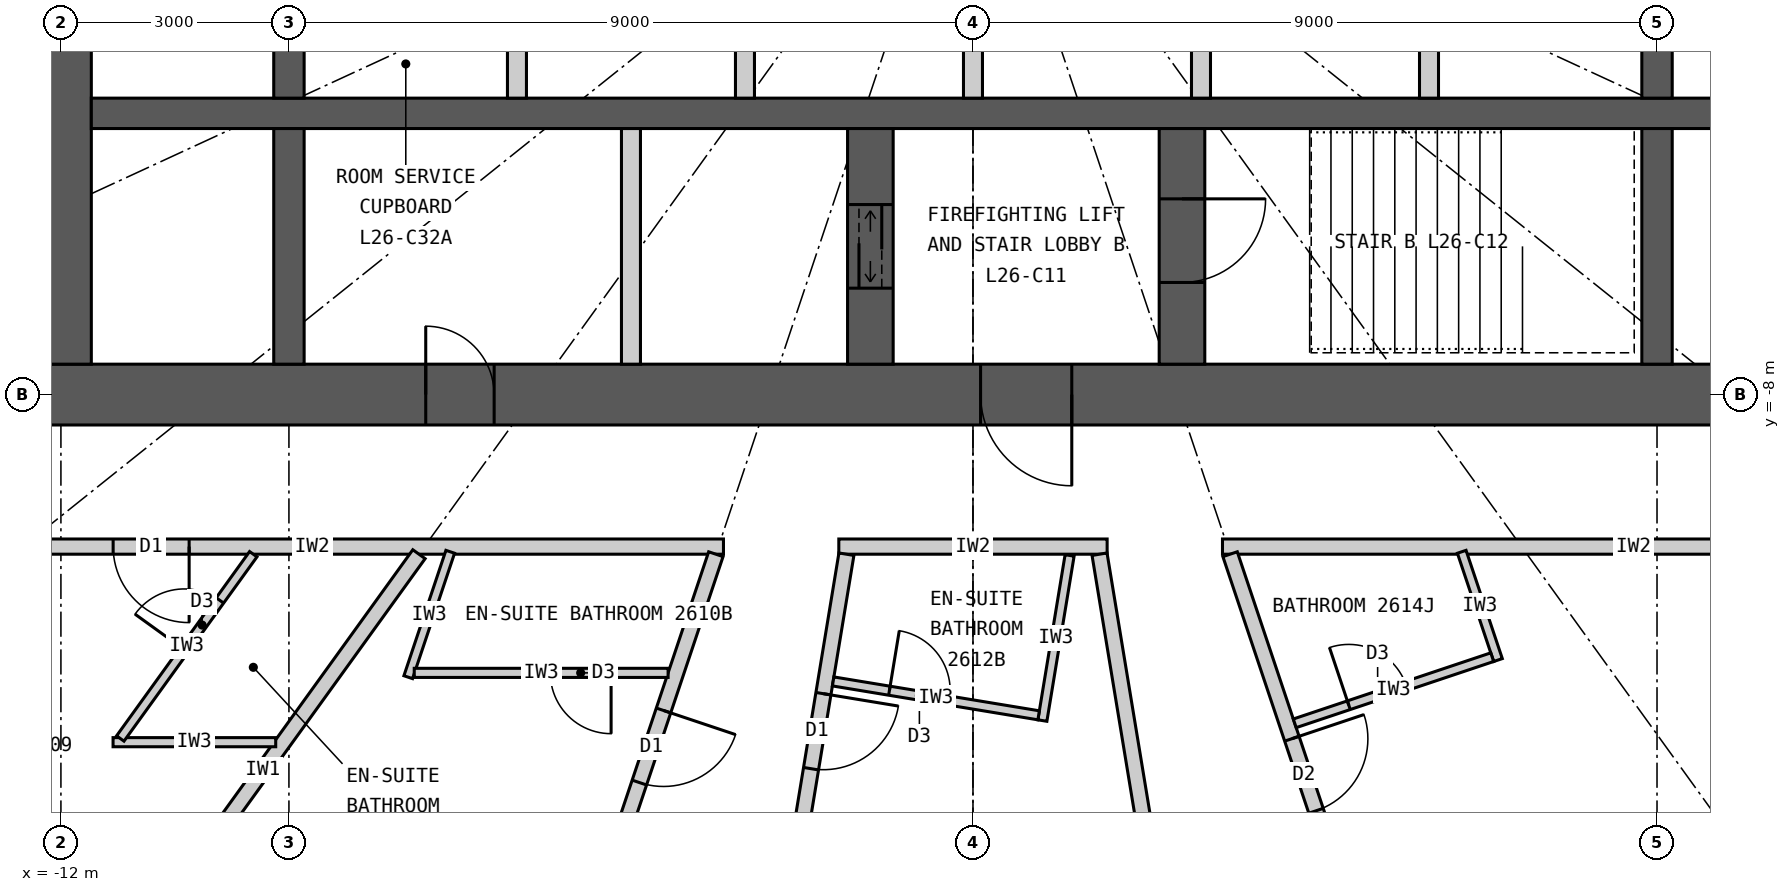
"""IFC4 building model, lengths in metres.
Left out: names, types, materials, properties, quantities, classifications, styles, units other than length and angle.
Written with IfcOpenShell. Run it as: python <this file> out.ifc"""

import sys

from ifc_helpers import new_model, si_unit, direction, frame, frame_2d, origin, place, context, subcontext, project, spatial, rectangle, extrude, element, fill, save


model = new_model("IFC4")
c1 = context("Model", 3, precision=1e-05, world=origin(), true_north=direction((0.0, 1.0)))
c2 = subcontext(c1, "Body", "Model", "MODEL_VIEW")
j1 = project(units=[si_unit("LENGTHUNIT", "METRE"), si_unit("PLANEANGLEUNIT", "RADIAN")], contexts=[c1])
p1 = place(None, origin())
s1 = spatial("IfcSite", under=j1, at=p1, CompositionType="ELEMENT")
p2 = place(p1, origin())
s2 = spatial("IfcBuilding", under=s1, at=p2, CompositionType="ELEMENT")
p3 = place(p2, frame((0.0, 0.0, 105.6)))
s3 = spatial("IfcBuildingStorey", under=s2, at=p3, CompositionType="ELEMENT", Elevation=105.6)
p4 = place(p3, frame((12.4, -8.0, 0.0), z_axis=(0.0, 0.0, 1.0), x_axis=(-1.0, 0.0, 0.0)))
e1 = element("IfcWall", 1, at=p4, inside=s3, PredefinedType="SHEAR", context=c2, shape_type="SweptSolid", body=[
    extrude(rectangle(XDim=24.8, YDim=0.8, at=frame_2d((12.4, 0.0))), origin(), (0.0, 0.0, 1.0), 3.3),
])
p5 = place(p4, frame((11.1, 0.0, 0.0)))
e2 = element("IfcOpeningElement", 2, at=p5, cuts=e1, PredefinedType="OPENING", context=c2, shape_type="SweptSolid", body=[
    extrude(rectangle(XDim=1.2, YDim=2.2, at=frame_2d((0.6, 1.1))), frame((0.0, 0.41, 0.0), z_axis=(0.0, -1.0, 0.0), x_axis=(1.0, 0.0, 0.0)), (0.0, 0.0, 1.0), 0.82),
])
p6 = place(p4, frame((18.7, 0.0, 0.0)))
e3 = element("IfcOpeningElement", 3, at=p6, cuts=e1, PredefinedType="OPENING", context=c2, shape_type="SweptSolid", body=[
    extrude(rectangle(XDim=0.9, YDim=2.2, at=frame_2d((0.45, 1.1))), frame((0.0, 0.41, 0.0), z_axis=(0.0, -1.0, 0.0), x_axis=(1.0, 0.0, 0.0)), (0.0, 0.0, 1.0), 0.82),
])
p7 = place(p3, frame((-12.0, 7.6, 0.0), z_axis=(0.0, 0.0, 1.0), x_axis=(0.0, -1.0, 0.0)))
e4 = element("IfcWall", 4, at=p7, inside=s3, PredefinedType="SHEAR", context=c2, shape_type="SweptSolid", body=[
    extrude(rectangle(XDim=15.2, YDim=0.8, at=frame_2d((7.6, 0.0))), origin(), (0.0, 0.0, 1.0), 3.3),
])
p8 = place(p7, frame((6.7, 0.0, 0.0)))
e5 = element("IfcOpeningElement", 5, at=p8, cuts=e4, PredefinedType="OPENING", context=c2, shape_type="SweptSolid", body=[
    extrude(rectangle(XDim=1.8, YDim=2.2, at=frame_2d((0.9, 1.1))), frame((0.0, 0.41, 0.0), z_axis=(0.0, -1.0, 0.0), x_axis=(1.0, 0.0, 0.0)), (0.0, 0.0, 1.0), 0.82),
])
p9 = place(p3, frame((-11.6, -4.3, 0.0), z_axis=(0.0, 0.0, 1.0), x_axis=(1.0, 0.0, 0.0)))
e6 = element("IfcWall", 6, at=p9, inside=s3, PredefinedType="SHEAR", context=c2, shape_type="SweptSolid", body=[
    extrude(rectangle(XDim=23.2, YDim=0.4, at=frame_2d((11.6, 0.0))), origin(), (0.0, 0.0, 1.0), 3.3),
])
p10 = place(p3, frame((-9.0, -4.1, 0.0), z_axis=(0.0, 0.0, 1.0), x_axis=(0.0, 1.0, 0.0)))
e7 = element("IfcWall", 7, at=p10, inside=s3, PredefinedType="SHEAR", context=c2, shape_type="SweptSolid", body=[
    extrude(rectangle(XDim=2.35, YDim=0.4, at=frame_2d((1.175, 0.0))), origin(), (0.0, 0.0, 1.0), 3.3),
])
p11 = place(p3, frame((-9.0, -7.6, 0.0), z_axis=(0.0, 0.0, 1.0), x_axis=(0.0, 1.0, 0.0)))
e8 = element("IfcWall", 8, at=p11, inside=s3, PredefinedType="SHEAR", context=c2, shape_type="SweptSolid", body=[
    extrude(rectangle(XDim=3.1, YDim=0.4, at=frame_2d((1.55, 0.0))), origin(), (0.0, 0.0, 1.0), 3.3),
])
p12 = place(p3, frame((9.0, -4.1, 0.0), z_axis=(0.0, 0.0, 1.0), x_axis=(0.0, 1.0, 0.0)))
e9 = element("IfcWall", 9, at=p12, inside=s3, PredefinedType="SHEAR", context=c2, shape_type="SweptSolid", body=[
    extrude(rectangle(XDim=2.35, YDim=0.4, at=frame_2d((1.175, 0.0))), origin(), (0.0, 0.0, 1.0), 3.3),
])
p13 = place(p3, frame((9.0, -7.6, 0.0), z_axis=(0.0, 0.0, 1.0), x_axis=(0.0, 1.0, 0.0)))
e10 = element("IfcWall", 10, at=p13, inside=s3, PredefinedType="SHEAR", context=c2, shape_type="SweptSolid", body=[
    extrude(rectangle(XDim=3.1, YDim=0.4, at=frame_2d((1.55, 0.0))), origin(), (0.0, 0.0, 1.0), 3.3),
])
p14 = place(p3, frame((2.75, -7.6, 0.0), z_axis=(0.0, 0.0, 1.0), x_axis=(0.0, 1.0, 0.0)))
e11 = element("IfcWall", 11, at=p14, inside=s3, PredefinedType="SHEAR", context=c2, shape_type="SweptSolid", body=[
    extrude(rectangle(XDim=3.1, YDim=0.6, at=frame_2d((1.55, 0.0))), origin(), (0.0, 0.0, 1.0), 3.3),
])
p15 = place(p14, frame((1.075, 0.0, 0.0)))
e12 = element("IfcOpeningElement", 12, at=p15, cuts=e11, PredefinedType="OPENING", context=c2, shape_type="SweptSolid", body=[
    extrude(rectangle(XDim=1.1, YDim=2.2, at=frame_2d((0.55, 1.1))), frame((0.0, 0.31, 0.0), z_axis=(0.0, -1.0, 0.0), x_axis=(1.0, 0.0, 0.0)), (0.0, 0.0, 1.0), 0.62),
])
p16 = place(p3, frame((-1.35, -7.6, 0.0), z_axis=(0.0, 0.0, 1.0), x_axis=(0.0, 1.0, 0.0)))
e13 = element("IfcWall", 13, at=p16, inside=s3, PredefinedType="SHEAR", context=c2, shape_type="SweptSolid", body=[
    extrude(rectangle(XDim=3.1, YDim=0.6, at=frame_2d((1.55, 0.0))), origin(), (0.0, 0.0, 1.0), 3.3),
])
p17 = place(p16, frame((1.0, 0.0, 0.0)))
e14 = element("IfcOpeningElement", 14, at=p17, cuts=e13, PredefinedType="OPENING", context=c2, shape_type="SweptSolid", body=[
    extrude(rectangle(XDim=1.1, YDim=2.2, at=frame_2d((0.55, 1.1))), frame((0.0, 0.31, 0.0), z_axis=(0.0, -1.0, 0.0), x_axis=(1.0, 0.0, 0.0)), (0.0, 0.0, 1.0), 0.62),
])
p18 = place(p3, frame((-4.5, -7.6, 0.0), z_axis=(0.0, 0.0, 1.0), x_axis=(0.0, 1.0, 0.0)))
e15 = element("IfcWall", 15, at=p18, inside=s3, PredefinedType="PARTITIONING", context=c2, shape_type="SweptSolid", body=[
    extrude(rectangle(XDim=3.1, YDim=0.25, at=frame_2d((1.55, 0.0))), origin(), (0.0, 0.0, 1.0), 3.3),
])
for number, where, z_axis, x_axis in (
    (16, (-6.0, -4.1, 0.0), (0.0, 0.0, 1.0), (0.0, 1.0, 0.0)),
    (17, (-3.0, -4.1, 0.0), (0.0, 0.0, 1.0), (0.0, 1.0, 0.0)),
    (18, (0.0, -4.1, 0.0), (0.0, 0.0, 1.0), (0.0, 1.0, 0.0)),
    (19, (3.0, -4.1, 0.0), (0.0, 0.0, 1.0), (0.0, 1.0, 0.0)),
    (20, (6.0, -4.1, 0.0), (0.0, 0.0, 1.0), (0.0, 1.0, 0.0)),
):
    element("IfcWall", number, at=place(p3, frame(where, z_axis=z_axis, x_axis=x_axis)), inside=s3, PredefinedType="PARTITIONING", context=c2, shape_type="SweptSolid", body=[
        extrude(rectangle(XDim=2.35, YDim=0.25, at=frame_2d((1.175, 0.0))), origin(), (0.0, 0.0, 1.0), 3.3),
    ])
p19 = place(p3, frame((14.1, -10.0, 0.0), z_axis=(0.0, 0.0, 1.0), x_axis=(-1.0, 0.0, 0.0)))
e21 = element("IfcWall", 21, at=p19, inside=s3, PredefinedType="PARTITIONING", context=c2, shape_type="SweptSolid", body=[
    extrude(rectangle(XDim=10.817, YDim=0.2, at=frame_2d((5.409, 0.0))), origin(), (0.0, 0.0, 1.0), 3.12),
])
p20 = place(p3, frame((1.765, -10.0, 0.0), z_axis=(0.0, 0.0, 1.0), x_axis=(-1.0, 0.0, 0.0)))
e22 = element("IfcWall", 22, at=p20, inside=s3, PredefinedType="PARTITIONING", context=c2, shape_type="SweptSolid", body=[
    extrude(rectangle(XDim=3.53, YDim=0.2, at=frame_2d((1.765, 0.0))), origin(), (0.0, 0.0, 1.0), 3.12),
])
p21 = place(p3, frame((-3.283, -10.0, 0.0), z_axis=(0.0, 0.0, 1.0), x_axis=(-1.0, 0.0, 0.0)))
e23 = element("IfcWall", 23, at=p21, inside=s3, PredefinedType="PARTITIONING", context=c2, shape_type="SweptSolid", body=[
    extrude(rectangle(XDim=10.817, YDim=0.2, at=frame_2d((5.409, 0.0))), origin(), (0.0, 0.0, 1.0), 3.12),
])
p22 = place(p21, frame((7.03, 0.0, 0.0)))
e24 = element("IfcOpeningElement", 24, at=p22, cuts=e23, PredefinedType="OPENING", context=c2, shape_type="SweptSolid", body=[
    extrude(rectangle(XDim=1.0, YDim=2.2, at=frame_2d((0.5, 1.1))), frame((0.0, 0.11, 0.0), z_axis=(0.0, -1.0, 0.0), x_axis=(1.0, 0.0, 0.0)), (0.0, 0.0, 1.0), 0.22),
])
p23 = place(p3, frame((-7.289, -10.1, 0.0), z_axis=(0.0, 0.0, 1.0), x_axis=(-0.585217367024, -0.81087645997, 0.0)))
e25 = element("IfcWall", 25, at=p23, inside=s3, PredefinedType="PARTITIONING", context=c2, shape_type="SweptSolid", body=[
    extrude(rectangle(XDim=7.016, YDim=0.2, at=frame_2d((3.508, 0.0))), origin(), (0.0, 0.0, 1.0), 2.27),
])
p24 = place(p3, frame((-3.383, -10.1, 0.0), z_axis=(0.0, 0.0, 1.0), x_axis=(-0.317603705574, -0.948223542318, 0.0)))
e26 = element("IfcWall", 26, at=p24, inside=s3, PredefinedType="PARTITIONING", context=c2, shape_type="SweptSolid", body=[
    extrude(rectangle(XDim=7.823, YDim=0.2, at=frame_2d((3.912, 0.0))), origin(), (0.0, 0.0, 1.0), 2.27),
])
p25 = place(p24, frame((2.168, 0.0, 0.0)))
e27 = element("IfcOpeningElement", 27, at=p25, cuts=e26, PredefinedType="OPENING", context=c2, shape_type="SweptSolid", body=[
    extrude(rectangle(XDim=1.0, YDim=2.2, at=frame_2d((0.5, 1.1))), frame((0.0, 0.11, 0.0), z_axis=(0.0, -1.0, 0.0), x_axis=(1.0, 0.0, 0.0)), (0.0, 0.0, 1.0), 0.22),
])
p26 = place(p3, frame((-1.665, -10.1, 0.0), z_axis=(0.0, 0.0, 1.0), x_axis=(-0.162660519103, -0.986682094459, 0.0)))
e28 = element("IfcWall", 28, at=p26, inside=s3, PredefinedType="PARTITIONING", context=c2, shape_type="SweptSolid", body=[
    extrude(rectangle(XDim=9.111, YDim=0.2, at=frame_2d((4.555, 0.0))), origin(), (0.0, 0.0, 1.0), 3.12),
])
p27 = place(p26, frame((1.86, 0.0, 0.0)))
e29 = element("IfcOpeningElement", 29, at=p27, cuts=e28, PredefinedType="OPENING", context=c2, shape_type="SweptSolid", body=[
    extrude(rectangle(XDim=1.0, YDim=2.2, at=frame_2d((0.5, 1.1))), frame((0.0, 0.11, 0.0), z_axis=(0.0, -1.0, 0.0), x_axis=(1.0, 0.0, 0.0)), (0.0, 0.0, 1.0), 0.22),
])
p28 = place(p3, frame((1.665, -10.1, 0.0), z_axis=(0.0, 0.0, 1.0), x_axis=(0.162660519103, -0.986682094459, 0.0)))
e30 = element("IfcWall", 30, at=p28, inside=s3, PredefinedType="PARTITIONING", context=c2, shape_type="SweptSolid", body=[
    extrude(rectangle(XDim=9.111, YDim=0.2, at=frame_2d((4.555, 0.0))), origin(), (0.0, 0.0, 1.0), 3.12),
])
p29 = place(p3, frame((3.383, -10.1, 0.0), z_axis=(0.0, 0.0, 1.0), x_axis=(0.317603705574, -0.948223542318, 0.0)))
e31 = element("IfcWall", 31, at=p29, inside=s3, PredefinedType="PARTITIONING", context=c2, shape_type="SweptSolid", body=[
    extrude(rectangle(XDim=7.823, YDim=0.2, at=frame_2d((3.912, 0.0))), origin(), (0.0, 0.0, 1.0), 2.27),
])
p30 = place(p29, frame((2.56, 0.0, 0.0)))
e32 = element("IfcOpeningElement", 32, at=p30, cuts=e31, PredefinedType="OPENING", context=c2, shape_type="SweptSolid", body=[
    extrude(rectangle(XDim=1.0, YDim=2.2, at=frame_2d((0.5, 1.1))), frame((0.0, 0.11, 0.0), z_axis=(0.0, -1.0, 0.0), x_axis=(1.0, 0.0, 0.0)), (0.0, 0.0, 1.0), 0.22),
])
p31 = place(p3, frame((-9.174, -12.573, 0.0), z_axis=(0.0, 0.0, 1.0), x_axis=(-1.0, 0.0, 0.0)))
e33 = element("IfcWall", 33, at=p31, inside=s3, PredefinedType="PARTITIONING", context=c2, shape_type="SweptSolid", body=[
    extrude(rectangle(XDim=2.14, YDim=0.12, at=frame_2d((1.07, 0.0))), origin(), (0.0, 0.0, 1.0), 3.12),
])
p32 = place(p3, frame((-9.469, -10.1, 0.0), z_axis=(0.0, 0.0, 1.0), x_axis=(-0.58520133861, -0.81088802759, 0.0)))
e34 = element("IfcWall", 34, at=p32, inside=s3, PredefinedType="PARTITIONING", context=c2, shape_type="SweptSolid", body=[
    extrude(rectangle(XDim=2.99, YDim=0.12, at=frame_2d((1.495, 0.0))), origin(), (0.0, 0.0, 1.0), 3.12),
])
p33 = place(p32, frame((0.75, 0.0, 0.0)))
e35 = element("IfcOpeningElement", 35, at=p33, cuts=e34, PredefinedType="OPENING", context=c2, shape_type="SweptSolid", body=[
    extrude(rectangle(XDim=0.8, YDim=2.1, at=frame_2d((0.4, 1.05))), frame((0.0, 0.07, 0.0), z_axis=(0.0, -1.0, 0.0), x_axis=(1.0, 0.0, 0.0)), (0.0, 0.0, 1.0), 0.14),
])
p34 = place(p3, frame((-6.878, -10.068, 0.0), z_axis=(0.0, 0.0, 1.0), x_axis=(-0.317532394508, -0.948247424694, 0.0)))
e36 = element("IfcWall", 36, at=p34, inside=s3, PredefinedType="PARTITIONING", context=c2, shape_type="SweptSolid", body=[
    extrude(rectangle(XDim=1.74, YDim=0.12, at=frame_2d((0.87, 0.0))), origin(), (0.0, 0.0, 1.0), 3.12),
])
p35 = place(p3, frame((-4.011, -11.661, 0.0), z_axis=(0.0, 0.0, 1.0), x_axis=(-1.0, 0.0, 0.0)))
e37 = element("IfcWall", 37, at=p35, inside=s3, PredefinedType="PARTITIONING", context=c2, shape_type="SweptSolid", body=[
    extrude(rectangle(XDim=3.34, YDim=0.12, at=frame_2d((1.67, 0.0))), origin(), (0.0, 0.0, 1.0), 3.12),
])
p36 = place(p35, frame((0.75, 0.0, 0.0)))
e38 = element("IfcOpeningElement", 38, at=p36, cuts=e37, PredefinedType="OPENING", context=c2, shape_type="SweptSolid", body=[
    extrude(rectangle(XDim=0.8, YDim=2.1, at=frame_2d((0.4, 1.05))), frame((0.0, 0.07, 0.0), z_axis=(0.0, -1.0, 0.0), x_axis=(1.0, 0.0, 0.0)), (0.0, 0.0, 1.0), 0.14),
])
p37 = place(p3, frame((1.271, -10.116, 0.0), z_axis=(0.0, 0.0, 1.0), x_axis=(-0.162672481395, -0.986680122328, 0.0)))
e39 = element("IfcWall", 39, at=p37, inside=s3, PredefinedType="PARTITIONING", context=c2, shape_type="SweptSolid", body=[
    extrude(rectangle(XDim=2.202, YDim=0.12, at=frame_2d((1.101, 0.0))), origin(), (0.0, 0.0, 1.0), 3.12),
])
p38 = place(p3, frame((-1.84, -11.774, 0.0), z_axis=(0.0, 0.0, 1.0), x_axis=(0.986676602341, -0.162693830222, 0.0)))
e40 = element("IfcWall", 40, at=p38, inside=s3, PredefinedType="PARTITIONING", context=c2, shape_type="SweptSolid", body=[
    extrude(rectangle(XDim=2.74, YDim=0.12, at=frame_2d((1.37, 0.0))), origin(), (0.0, 0.0, 1.0), 3.12),
])
p39 = place(p38, frame((0.75, 0.0, 0.0)))
e41 = element("IfcOpeningElement", 41, at=p39, cuts=e40, PredefinedType="OPENING", context=c2, shape_type="SweptSolid", body=[
    extrude(rectangle(XDim=0.8, YDim=2.1, at=frame_2d((0.4, 1.05))), frame((0.0, 0.07, 0.0), z_axis=(0.0, -1.0, 0.0), x_axis=(1.0, 0.0, 0.0)), (0.0, 0.0, 1.0), 0.14),
])
p40 = place(p3, frame((6.431, -10.068, 0.0), z_axis=(0.0, 0.0, 1.0), x_axis=(0.317592729703, -0.948227218571, 0.0)))
e42 = element("IfcWall", 42, at=p40, inside=s3, PredefinedType="PARTITIONING", context=c2, shape_type="SweptSolid", body=[
    extrude(rectangle(XDim=1.502, YDim=0.12, at=frame_2d((0.751, 0.0))), origin(), (0.0, 0.0, 1.0), 3.12),
])
p41 = place(p3, frame((4.234, -12.325, 0.0), z_axis=(0.0, 0.0, 1.0), x_axis=(0.948236840279, 0.317564001011, 0.0)))
e43 = element("IfcWall", 43, at=p41, inside=s3, PredefinedType="PARTITIONING", context=c2, shape_type="SweptSolid", body=[
    extrude(rectangle(XDim=2.74, YDim=0.12, at=frame_2d((1.37, 0.0))), origin(), (0.0, 0.0, 1.0), 3.12),
])
p42 = place(p41, frame((0.75, 0.0, 0.0)))
e44 = element("IfcOpeningElement", 44, at=p42, cuts=e43, PredefinedType="OPENING", context=c2, shape_type="SweptSolid", body=[
    extrude(rectangle(XDim=0.8, YDim=2.1, at=frame_2d((0.4, 1.05))), frame((0.0, 0.07, 0.0), z_axis=(0.0, -1.0, 0.0), x_axis=(1.0, 0.0, 0.0)), (0.0, 0.0, 1.0), 0.14),
])
p43 = place(p33, origin())
e45 = element("IfcDoor", 45, at=p43, inside=s3, OperationType="SINGLE_SWING_RIGHT", PredefinedType="DOOR", context=c2, shape_type="SweptSolid", body=[
    extrude(rectangle(XDim=0.8, YDim=2.1, at=frame_2d((0.4, 1.05))), frame((0.0, 0.025, 0.0), z_axis=(0.0, -1.0, 0.0), x_axis=(1.0, 0.0, 0.0)), (0.0, 0.0, 1.0), 0.05),
])
fill(e35, e45)
p44 = place(p22, origin())
e46 = element("IfcDoor", 46, at=p44, inside=s3, OperationType="SINGLE_SWING_LEFT", PredefinedType="DOOR", context=c2, shape_type="SweptSolid", body=[
    extrude(rectangle(XDim=1.0, YDim=2.2, at=frame_2d((0.5, 1.1))), frame((0.0, 0.025, 0.0), z_axis=(0.0, -1.0, 0.0), x_axis=(1.0, 0.0, 0.0)), (0.0, 0.0, 1.0), 0.05),
])
fill(e24, e46)
p45 = place(p36, origin())
e47 = element("IfcDoor", 47, at=p45, inside=s3, OperationType="SINGLE_SWING_LEFT", PredefinedType="DOOR", context=c2, shape_type="SweptSolid", body=[
    extrude(rectangle(XDim=0.8, YDim=2.1, at=frame_2d((0.4, 1.05))), frame((0.0, 0.025, 0.0), z_axis=(0.0, -1.0, 0.0), x_axis=(1.0, 0.0, 0.0)), (0.0, 0.0, 1.0), 0.05),
])
fill(e38, e47)
p46 = place(p25, origin())
e48 = element("IfcDoor", 48, at=p46, inside=s3, OperationType="SINGLE_SWING_LEFT", PredefinedType="DOOR", context=c2, shape_type="SweptSolid", body=[
    extrude(rectangle(XDim=1.0, YDim=2.2, at=frame_2d((0.5, 1.1))), frame((0.0, 0.025, 0.0), z_axis=(0.0, -1.0, 0.0), x_axis=(1.0, 0.0, 0.0)), (0.0, 0.0, 1.0), 0.05),
])
fill(e27, e48)
p47 = place(p39, origin())
e49 = element("IfcDoor", 49, at=p47, inside=s3, OperationType="SINGLE_SWING_LEFT", PredefinedType="DOOR", context=c2, shape_type="SweptSolid", body=[
    extrude(rectangle(XDim=0.8, YDim=2.1, at=frame_2d((0.4, 1.05))), frame((0.0, 0.025, 0.0), z_axis=(0.0, -1.0, 0.0), x_axis=(1.0, 0.0, 0.0)), (0.0, 0.0, 1.0), 0.05),
])
fill(e41, e49)
p48 = place(p27, origin())
e50 = element("IfcDoor", 50, at=p48, inside=s3, OperationType="SINGLE_SWING_LEFT", PredefinedType="DOOR", context=c2, shape_type="SweptSolid", body=[
    extrude(rectangle(XDim=1.0, YDim=2.2, at=frame_2d((0.5, 1.1))), frame((0.0, 0.025, 0.0), z_axis=(0.0, -1.0, 0.0), x_axis=(1.0, 0.0, 0.0)), (0.0, 0.0, 1.0), 0.05),
])
fill(e29, e50)
p49 = place(p42, origin())
e51 = element("IfcDoor", 51, at=p49, inside=s3, OperationType="SINGLE_SWING_LEFT", PredefinedType="DOOR", context=c2, shape_type="SweptSolid", body=[
    extrude(rectangle(XDim=0.8, YDim=2.1, at=frame_2d((0.4, 1.05))), frame((0.0, 0.025, 0.0), z_axis=(0.0, -1.0, 0.0), x_axis=(1.0, 0.0, 0.0)), (0.0, 0.0, 1.0), 0.05),
])
fill(e44, e51)
p50 = place(p30, origin())
e52 = element("IfcDoor", 52, at=p50, inside=s3, OperationType="SINGLE_SWING_LEFT", PredefinedType="DOOR", context=c2, shape_type="SweptSolid", body=[
    extrude(rectangle(XDim=1.0, YDim=2.2, at=frame_2d((0.5, 1.1))), frame((0.0, 0.025, 0.0), z_axis=(0.0, -1.0, 0.0), x_axis=(1.0, 0.0, 0.0)), (0.0, 0.0, 1.0), 0.05),
])
fill(e32, e52)
p51 = place(p5, origin())
e53 = element("IfcDoor", 53, at=p51, inside=s3, OperationType="SINGLE_SWING_LEFT", PredefinedType="DOOR", context=c2, shape_type="SweptSolid", body=[
    extrude(rectangle(XDim=1.2, YDim=2.2, at=frame_2d((0.6, 1.1))), frame((0.0, 0.025, 0.0), z_axis=(0.0, -1.0, 0.0), x_axis=(1.0, 0.0, 0.0)), (0.0, 0.0, 1.0), 0.05),
])
fill(e2, e53)
p52 = place(p15, origin())
e54 = element("IfcDoor", 54, at=p52, inside=s3, OperationType="SINGLE_SWING_RIGHT", PredefinedType="DOOR", context=c2, shape_type="SweptSolid", body=[
    extrude(rectangle(XDim=1.1, YDim=2.2, at=frame_2d((0.55, 1.1))), frame((0.0, 0.025, 0.0), z_axis=(0.0, -1.0, 0.0), x_axis=(1.0, 0.0, 0.0)), (0.0, 0.0, 1.0), 0.05),
])
fill(e12, e54)
p53 = place(p17, origin())
e55 = element("IfcDoor", 55, at=p53, inside=s3, OperationType="DOUBLE_DOOR_SLIDING", PredefinedType="DOOR", context=c2, shape_type="SweptSolid", body=[
    extrude(rectangle(XDim=1.1, YDim=2.2, at=frame_2d((0.55, 1.1))), frame((0.0, 0.025, 0.0), z_axis=(0.0, -1.0, 0.0), x_axis=(1.0, 0.0, 0.0)), (0.0, 0.0, 1.0), 0.05),
])
fill(e14, e55)
p54 = place(p6, origin())
e56 = element("IfcDoor", 56, at=p54, inside=s3, OperationType="SINGLE_SWING_RIGHT", PredefinedType="DOOR", context=c2, shape_type="SweptSolid", body=[
    extrude(rectangle(XDim=0.9, YDim=2.2, at=frame_2d((0.45, 1.1))), frame((0.0, 0.025, 0.0), z_axis=(0.0, -1.0, 0.0), x_axis=(1.0, 0.0, 0.0)), (0.0, 0.0, 1.0), 0.05),
])
fill(e3, e56)
save(model, sys.argv[1])
